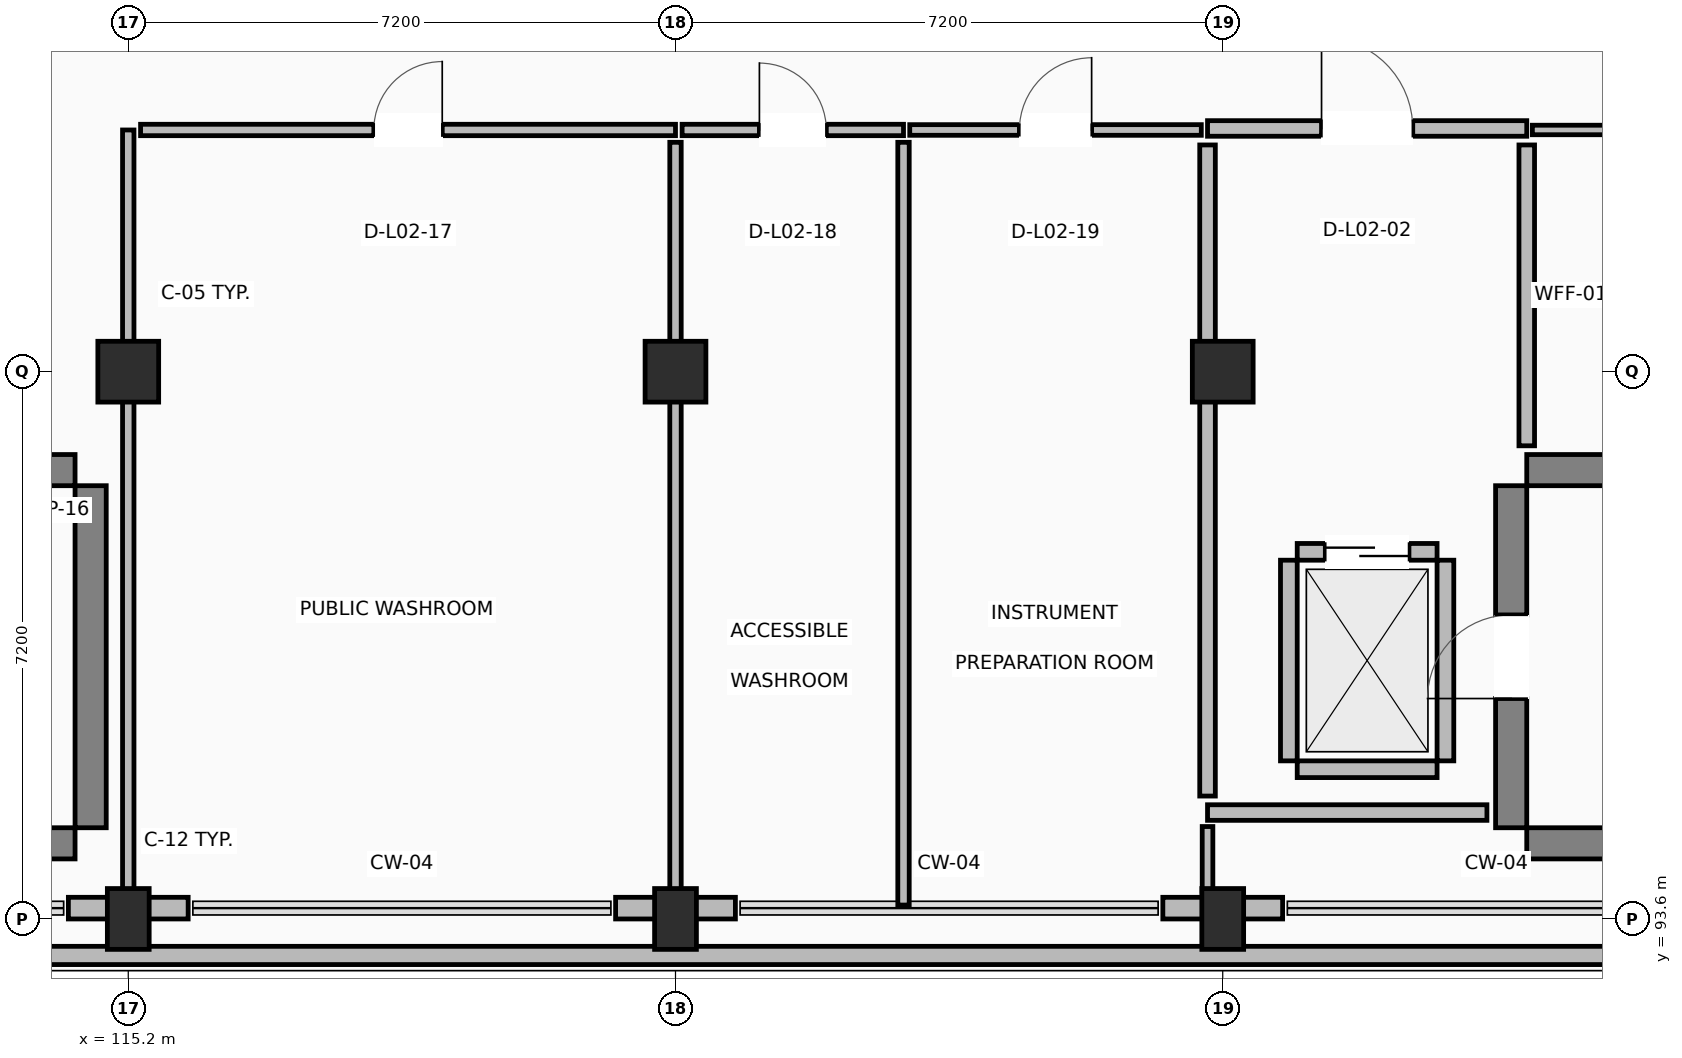
"""IFC4 building model, lengths in metres.
Left out: names, types, materials, properties, quantities, classifications, styles, units other than length and angle.
Written with IfcOpenShell. Run it as: python <this file> out.ifc"""

import sys

from ifc_helpers import new_model, si_unit, direction, frame, frame_2d, origin, origin_2d, place, context, subcontext, project, spatial, rectangle, extrude, element, fill, save


model = new_model("IFC4")
c1 = context("Model", 3, precision=1e-05, world=origin(), true_north=direction((0.0, 1.0)))
c2 = subcontext(c1, "Body", "Model", "MODEL_VIEW")
j1 = project(units=[si_unit("LENGTHUNIT", "METRE"), si_unit("PLANEANGLEUNIT", "RADIAN")], contexts=[c1])
p1 = place(None, origin())
s1 = spatial("IfcSite", under=j1, at=p1, CompositionType="ELEMENT")
p2 = place(p1, origin())
s2 = spatial("IfcBuilding", under=s1, at=p2, CompositionType="ELEMENT")
p3 = place(p2, frame((0.0, 0.0, 9.0)))
s3 = spatial("IfcBuildingStorey", under=s2, at=p3, CompositionType="ELEMENT", Elevation=9.0)
p4 = place(p3, frame((115.2, 93.6, 0.0), z_axis=(0.0, 0.0, 1.0), x_axis=(1.0, 0.0, 0.0)))
e1 = element("IfcColumn", 1, at=p4, inside=s3, PredefinedType="COLUMN", context=c2, shape_type="SweptSolid", body=[
    extrude(rectangle(XDim=0.55, YDim=0.8, at=origin_2d()), origin(), (0.0, 0.0, 1.0), 4.22),
])
p5 = place(p3, frame((115.2, 100.8, 0.0), z_axis=(0.0, 0.0, 1.0), x_axis=(1.0, 0.0, 0.0)))
e2 = element("IfcColumn", 2, at=p5, inside=s3, PredefinedType="COLUMN", context=c2, shape_type="SweptSolid", body=[
    extrude(rectangle(XDim=0.8, YDim=0.8, at=origin_2d()), origin(), (0.0, 0.0, 1.0), 4.22),
])
p6 = place(p3, frame((122.4, 93.6, 0.0), z_axis=(0.0, 0.0, 1.0), x_axis=(1.0, 0.0, 0.0)))
e3 = element("IfcColumn", 3, at=p6, inside=s3, PredefinedType="COLUMN", context=c2, shape_type="SweptSolid", body=[
    extrude(rectangle(XDim=0.55, YDim=0.8, at=origin_2d()), origin(), (0.0, 0.0, 1.0), 4.22),
])
p7 = place(p3, frame((122.4, 100.8, 0.0), z_axis=(0.0, 0.0, 1.0), x_axis=(1.0, 0.0, 0.0)))
e4 = element("IfcColumn", 4, at=p7, inside=s3, PredefinedType="COLUMN", context=c2, shape_type="SweptSolid", body=[
    extrude(rectangle(XDim=0.8, YDim=0.8, at=origin_2d()), origin(), (0.0, 0.0, 1.0), 4.22),
])
p8 = place(p3, frame((129.6, 93.6, 0.0), z_axis=(0.0, 0.0, 1.0), x_axis=(1.0, 0.0, 0.0)))
e5 = element("IfcColumn", 5, at=p8, inside=s3, PredefinedType="COLUMN", context=c2, shape_type="SweptSolid", body=[
    extrude(rectangle(XDim=0.55, YDim=0.8, at=origin_2d()), origin(), (0.0, 0.0, 1.0), 4.22),
])
p9 = place(p3, frame((129.6, 100.8, 0.0), z_axis=(0.0, 0.0, 1.0), x_axis=(1.0, 0.0, 0.0)))
e6 = element("IfcColumn", 6, at=p9, inside=s3, PredefinedType="COLUMN", context=c2, shape_type="SweptSolid", body=[
    extrude(rectangle(XDim=0.8, YDim=0.8, at=origin_2d()), origin(), (0.0, 0.0, 1.0), 4.22),
])
for number, where, z_axis, x_axis in (
    (7, (105.0, 94.595, 0.0), (0.0, 0.0, 1.0), (1.0, 0.0, 0.0)),
    (8, (105.0, 99.505, 0.0), (0.0, 0.0, 1.0), (1.0, 0.0, 0.0)),
):
    element("IfcWall", number, at=place(p3, frame(where, z_axis=z_axis, x_axis=x_axis)), inside=s3, PredefinedType="SHEAR", context=c2, shape_type="SweptSolid", body=[
        extrude(rectangle(XDim=9.5, YDim=0.41, at=frame_2d((4.75, 0.0))), origin(), (0.0, 0.0, 1.0), 4.22),
    ])
p10 = place(p3, frame((114.705, 94.8, 0.0), z_axis=(0.0, 0.0, 1.0), x_axis=(0.0, 1.0, 0.0)))
e9 = element("IfcWall", 9, at=p10, inside=s3, PredefinedType="SHEAR", context=c2, shape_type="SweptSolid", body=[
    extrude(rectangle(XDim=4.5, YDim=0.41, at=frame_2d((2.25, 0.0))), origin(), (0.0, 0.0, 1.0), 4.22),
])
for number, where, z_axis, x_axis in (
    (10, (133.6, 94.595, 0.0), (0.0, 0.0, 1.0), (1.0, 0.0, 0.0)),
    (11, (133.6, 99.505, 0.0), (0.0, 0.0, 1.0), (1.0, 0.0, 0.0)),
):
    element("IfcWall", number, at=place(p3, frame(where, z_axis=z_axis, x_axis=x_axis)), inside=s3, PredefinedType="SHEAR", context=c2, shape_type="SweptSolid", body=[
        extrude(rectangle(XDim=9.5, YDim=0.41, at=frame_2d((4.75, 0.0))), origin(), (0.0, 0.0, 1.0), 4.22),
    ])
p11 = place(p3, frame((133.395, 94.8, 0.0), z_axis=(0.0, 0.0, 1.0), x_axis=(0.0, 1.0, 0.0)))
e12 = element("IfcWall", 12, at=p11, inside=s3, PredefinedType="SHEAR", context=c2, shape_type="SweptSolid", body=[
    extrude(rectangle(XDim=4.5, YDim=0.41, at=frame_2d((2.25, 0.0))), origin(), (0.0, 0.0, 1.0), 4.22),
])
p12 = place(p11, frame((1.7, 0.0, 0.0)))
e13 = element("IfcOpeningElement", 13, at=p12, cuts=e12, PredefinedType="OPENING", context=c2, shape_type="SweptSolid", body=[
    extrude(rectangle(XDim=1.1, YDim=2.15, at=frame_2d((0.55, 1.075))), frame((0.0, 0.215, 0.0), z_axis=(0.0, -1.0, 0.0), x_axis=(1.0, 0.0, 0.0)), (0.0, 0.0, 1.0), 0.43),
])
for number, where, z_axis, x_axis in (
    (14, (114.412, 93.742, 0.0), (0.0, 0.0, 1.0), (1.0, 0.0, 0.0)),
    (15, (121.612, 93.742, 0.0), (0.0, 0.0, 1.0), (1.0, 0.0, 0.0)),
    (16, (128.812, 93.742, 0.0), (0.0, 0.0, 1.0), (1.0, 0.0, 0.0)),
):
    element("IfcWall", number, at=place(p3, frame(where, z_axis=z_axis, x_axis=x_axis)), inside=s3, PredefinedType="STANDARD", context=c2, shape_type="SweptSolid", body=[
        extrude(rectangle(XDim=1.576, YDim=0.285, at=frame_2d((0.788, 0.0))), origin(), (0.0, 0.0, 1.0), 3.26),
    ])
p13 = place(p3, frame((136.44, 93.12, 0.0), z_axis=(0.0, 0.0, 1.0), x_axis=(-1.0, 0.0, 0.0)))
e17 = element("IfcWall", 17, at=p13, inside=s3, PredefinedType="PARAPET", context=c2, shape_type="SweptSolid", body=[
    extrude(rectangle(XDim=57.84, YDim=0.24, at=frame_2d((28.92, 0.0))), origin(), (0.0, 0.0, 1.0), 1.12),
])
p14 = place(p3, frame((130.58, 95.57, 0.0), z_axis=(0.0, 0.0, 1.0), x_axis=(1.0, 0.0, 0.0)))
e18 = element("IfcWall", 18, at=p14, inside=s3, PredefinedType="STANDARD", context=c2, shape_type="SweptSolid", body=[
    extrude(rectangle(XDim=1.84, YDim=0.22, at=frame_2d((0.92, 0.0))), origin(), (0.0, 0.0, 1.0), 3.26),
])
p15 = place(p3, frame((130.58, 98.43, 0.0), z_axis=(0.0, 0.0, 1.0), x_axis=(1.0, 0.0, 0.0)))
e19 = element("IfcWall", 19, at=p15, inside=s3, PredefinedType="STANDARD", context=c2, shape_type="SweptSolid", body=[
    extrude(rectangle(XDim=1.84, YDim=0.22, at=frame_2d((0.92, 0.0))), origin(), (0.0, 0.0, 1.0), 3.26),
])
p16 = place(p15, frame((0.37, 0.0, 0.0)))
e20 = element("IfcOpeningElement", 20, at=p16, cuts=e19, PredefinedType="OPENING", context=c2, shape_type="SweptSolid", body=[
    extrude(rectangle(XDim=1.1, YDim=2.15, at=frame_2d((0.55, 1.075))), frame((0.0, 0.12, 0.0), z_axis=(0.0, -1.0, 0.0), x_axis=(1.0, 0.0, 0.0)), (0.0, 0.0, 1.0), 0.24),
])
for number, where, z_axis, x_axis in (
    (21, (130.47, 95.68, 0.0), (0.0, 0.0, 1.0), (0.0, 1.0, 0.0)),
    (22, (132.53, 95.68, 0.0), (0.0, 0.0, 1.0), (0.0, 1.0, 0.0)),
):
    element("IfcWall", number, at=place(p3, frame(where, z_axis=z_axis, x_axis=x_axis)), inside=s3, PredefinedType="STANDARD", context=c2, shape_type="SweptSolid", body=[
        extrude(rectangle(XDim=2.64, YDim=0.22, at=frame_2d((1.32, 0.0))), origin(), (0.0, 0.0, 1.0), 3.26),
    ])
p17 = place(p3, frame((129.4, 104.0, 0.0), z_axis=(0.0, 0.0, 1.0), x_axis=(1.0, 0.0, 0.0)))
e23 = element("IfcWall", 23, at=p17, inside=s3, PredefinedType="PARTITIONING", context=c2, shape_type="SweptSolid", body=[
    extrude(rectangle(XDim=4.2, YDim=0.205, at=frame_2d((2.1, 0.0))), origin(), (0.0, 0.0, 1.0), 3.26),
])
p18 = place(p17, frame((1.5, 0.0, 0.0)))
e24 = element("IfcOpeningElement", 24, at=p18, cuts=e23, PredefinedType="OPENING", context=c2, shape_type="SweptSolid", body=[
    extrude(rectangle(XDim=1.2, YDim=2.15, at=frame_2d((0.6, 1.075))), frame((0.0, 0.113, 0.0), z_axis=(0.0, -1.0, 0.0), x_axis=(1.0, 0.0, 0.0)), (0.0, 0.0, 1.0), 0.225),
])
p19 = place(p3, frame((133.6, 103.783, 0.0), z_axis=(0.0, 0.0, 1.0), x_axis=(0.0, -1.0, 0.0)))
e25 = element("IfcWall", 25, at=p19, inside=s3, PredefinedType="PARTITIONING", context=c2, shape_type="SweptSolid", body=[
    extrude(rectangle(XDim=3.958, YDim=0.205, at=frame_2d((1.979, 0.0))), origin(), (0.0, 0.0, 1.0), 3.26),
])
p20 = place(p3, frame((133.076, 95.0, 0.0), z_axis=(0.0, 0.0, 1.0), x_axis=(-1.0, 0.0, 0.0)))
e26 = element("IfcWall", 26, at=p20, inside=s3, PredefinedType="PARTITIONING", context=c2, shape_type="SweptSolid", body=[
    extrude(rectangle(XDim=3.676, YDim=0.205, at=frame_2d((1.838, 0.0))), origin(), (0.0, 0.0, 1.0), 3.26),
])
p21 = place(p3, frame((129.4, 95.217, 0.0), z_axis=(0.0, 0.0, 1.0), x_axis=(0.0, 1.0, 0.0)))
e27 = element("IfcWall", 27, at=p21, inside=s3, PredefinedType="PARTITIONING", context=c2, shape_type="SweptSolid", body=[
    extrude(rectangle(XDim=8.566, YDim=0.205, at=frame_2d((4.283, 0.0))), origin(), (0.0, 0.0, 1.0), 3.26),
])
p22 = place(p3, frame((115.2, 93.972, 0.0), z_axis=(0.0, 0.0, 1.0), x_axis=(0.0, 1.0, 0.0)))
e28 = element("IfcWall", 28, at=p22, inside=s3, PredefinedType="PARTITIONING", context=c2, shape_type="SweptSolid", body=[
    extrude(rectangle(XDim=10.008, YDim=0.15, at=frame_2d((5.004, 0.0))), origin(), (0.0, 0.0, 1.0), 3.26),
])
p23 = place(p3, frame((115.362, 103.98, 0.0), z_axis=(0.0, 0.0, 1.0), x_axis=(1.0, 0.0, 0.0)))
e29 = element("IfcWall", 29, at=p23, inside=s3, PredefinedType="PARTITIONING", context=c2, shape_type="SweptSolid", body=[
    extrude(rectangle(XDim=7.038, YDim=0.15, at=frame_2d((3.519, 0.0))), origin(), (0.0, 0.0, 1.0), 3.26),
])
p24 = place(p23, frame((3.069, 0.0, 0.0)))
e30 = element("IfcOpeningElement", 30, at=p24, cuts=e29, PredefinedType="OPENING", context=c2, shape_type="SweptSolid", body=[
    extrude(rectangle(XDim=0.9, YDim=2.1, at=frame_2d((0.45, 1.05))), frame((0.0, 0.085, 0.0), z_axis=(0.0, -1.0, 0.0), x_axis=(1.0, 0.0, 0.0)), (0.0, 0.0, 1.0), 0.17),
])
p25 = place(p3, frame((122.4, 103.818, 0.0), z_axis=(0.0, 0.0, 1.0), x_axis=(0.0, -1.0, 0.0)))
e31 = element("IfcWall", 31, at=p25, inside=s3, PredefinedType="PARTITIONING", context=c2, shape_type="SweptSolid", body=[
    extrude(rectangle(XDim=9.846, YDim=0.15, at=frame_2d((4.923, 0.0))), origin(), (0.0, 0.0, 1.0), 3.26),
])
p26 = place(p3, frame((122.487, 103.98, 0.0), z_axis=(0.0, 0.0, 1.0), x_axis=(1.0, 0.0, 0.0)))
e32 = element("IfcWall", 32, at=p26, inside=s3, PredefinedType="PARTITIONING", context=c2, shape_type="SweptSolid", body=[
    extrude(rectangle(XDim=2.913, YDim=0.15, at=frame_2d((1.457, 0.0))), origin(), (0.0, 0.0, 1.0), 3.26),
])
p27 = place(p26, frame((1.017, 0.0, 0.0)))
e33 = element("IfcOpeningElement", 33, at=p27, cuts=e32, PredefinedType="OPENING", context=c2, shape_type="SweptSolid", body=[
    extrude(rectangle(XDim=0.88, YDim=2.1, at=frame_2d((0.44, 1.05))), frame((0.0, 0.085, 0.0), z_axis=(0.0, -1.0, 0.0), x_axis=(1.0, 0.0, 0.0)), (0.0, 0.0, 1.0), 0.17),
])
p28 = place(p3, frame((125.4, 103.818, 0.0), z_axis=(0.0, 0.0, 1.0), x_axis=(0.0, -1.0, 0.0)))
e34 = element("IfcWall", 34, at=p28, inside=s3, PredefinedType="PARTITIONING", context=c2, shape_type="SweptSolid", body=[
    extrude(rectangle(XDim=10.035, YDim=0.15, at=frame_2d((5.018, 0.0))), origin(), (0.0, 0.0, 1.0), 3.26),
])
p29 = place(p3, frame((125.482, 103.98, 0.0), z_axis=(0.0, 0.0, 1.0), x_axis=(1.0, 0.0, 0.0)))
e35 = element("IfcWall", 35, at=p29, inside=s3, PredefinedType="PARTITIONING", context=c2, shape_type="SweptSolid", body=[
    extrude(rectangle(XDim=3.836, YDim=0.14, at=frame_2d((1.918, 0.0))), origin(), (0.0, 0.0, 1.0), 3.26),
])
p30 = place(p29, frame((1.443, 0.0, 0.0)))
e36 = element("IfcOpeningElement", 36, at=p30, cuts=e35, PredefinedType="OPENING", context=c2, shape_type="SweptSolid", body=[
    extrude(rectangle(XDim=0.95, YDim=2.1, at=frame_2d((0.475, 1.05))), frame((0.0, 0.08, 0.0), z_axis=(0.0, -1.0, 0.0), x_axis=(1.0, 0.0, 0.0)), (0.0, 0.0, 1.0), 0.16),
])
p31 = place(p3, frame((129.4, 94.816, 0.0), z_axis=(0.0, 0.0, 1.0), x_axis=(0.0, -1.0, 0.0)))
e37 = element("IfcWall", 37, at=p31, inside=s3, PredefinedType="PARTITIONING", context=c2, shape_type="SweptSolid", body=[
    extrude(rectangle(XDim=0.849, YDim=0.14, at=frame_2d((0.424, 0.0))), origin(), (0.0, 0.0, 1.0), 3.26),
])
p32 = place(p3, frame((133.674, 103.98, 0.0), z_axis=(0.0, 0.0, 1.0), x_axis=(1.0, 0.0, 0.0)))
e38 = element("IfcWall", 38, at=p32, inside=s3, PredefinedType="PARTITIONING", context=c2, shape_type="SweptSolid", body=[
    extrude(rectangle(XDim=11.306, YDim=0.125, at=frame_2d((5.653, 0.0))), origin(), (0.0, 0.0, 1.0), 3.26),
])
p33 = place(p32, frame((5.193, 0.0, 0.0)))
e39 = element("IfcOpeningElement", 39, at=p33, cuts=e38, PredefinedType="OPENING", context=c2, shape_type="SweptSolid", body=[
    extrude(rectangle(XDim=0.92, YDim=2.1, at=frame_2d((0.46, 1.05))), frame((0.0, 0.073, 0.0), z_axis=(0.0, -1.0, 0.0), x_axis=(1.0, 0.0, 0.0)), (0.0, 0.0, 1.0), 0.145),
])
p34 = place(p12, origin())
e40 = element("IfcDoor", 40, at=p34, inside=s3, OperationType="SINGLE_SWING_LEFT", PredefinedType="DOOR", context=c2, shape_type="SweptSolid", body=[
    extrude(rectangle(XDim=1.1, YDim=2.15, at=frame_2d((0.55, 1.075))), frame((0.0, 0.025, 0.0), z_axis=(0.0, -1.0, 0.0), x_axis=(1.0, 0.0, 0.0)), (0.0, 0.0, 1.0), 0.05),
])
fill(e13, e40)
p35 = place(p16, origin())
e41 = element("IfcDoor", 41, at=p35, inside=s3, OperationType="SLIDING_TO_LEFT", PredefinedType="DOOR", context=c2, shape_type="SweptSolid", body=[
    extrude(rectangle(XDim=1.1, YDim=2.15, at=frame_2d((0.55, 1.075))), frame((0.0, 0.025, 0.0), z_axis=(0.0, -1.0, 0.0), x_axis=(1.0, 0.0, 0.0)), (0.0, 0.0, 1.0), 0.05),
])
fill(e20, e41)
p36 = place(p18, origin())
e42 = element("IfcDoor", 42, at=p36, inside=s3, OperationType="SINGLE_SWING_LEFT", PredefinedType="DOOR", context=c2, shape_type="SweptSolid", body=[
    extrude(rectangle(XDim=1.2, YDim=2.15, at=frame_2d((0.6, 1.075))), frame((0.0, 0.025, 0.0), z_axis=(0.0, -1.0, 0.0), x_axis=(1.0, 0.0, 0.0)), (0.0, 0.0, 1.0), 0.05),
])
fill(e24, e42)
p37 = place(p24, origin())
e43 = element("IfcDoor", 43, at=p37, inside=s3, OperationType="SINGLE_SWING_RIGHT", PredefinedType="DOOR", context=c2, shape_type="SweptSolid", body=[
    extrude(rectangle(XDim=0.9, YDim=2.1, at=frame_2d((0.45, 1.05))), frame((0.0, 0.025, 0.0), z_axis=(0.0, -1.0, 0.0), x_axis=(1.0, 0.0, 0.0)), (0.0, 0.0, 1.0), 0.05),
])
fill(e30, e43)
p38 = place(p27, origin())
e44 = element("IfcDoor", 44, at=p38, inside=s3, OperationType="SINGLE_SWING_LEFT", PredefinedType="DOOR", context=c2, shape_type="SweptSolid", body=[
    extrude(rectangle(XDim=0.88, YDim=2.1, at=frame_2d((0.44, 1.05))), frame((0.0, 0.025, 0.0), z_axis=(0.0, -1.0, 0.0), x_axis=(1.0, 0.0, 0.0)), (0.0, 0.0, 1.0), 0.05),
])
fill(e33, e44)
p39 = place(p30, origin())
e45 = element("IfcDoor", 45, at=p39, inside=s3, OperationType="SINGLE_SWING_RIGHT", PredefinedType="DOOR", context=c2, shape_type="SweptSolid", body=[
    extrude(rectangle(XDim=0.95, YDim=2.1, at=frame_2d((0.475, 1.05))), frame((0.0, 0.025, 0.0), z_axis=(0.0, -1.0, 0.0), x_axis=(1.0, 0.0, 0.0)), (0.0, 0.0, 1.0), 0.05),
])
fill(e36, e45)
save(model, sys.argv[1])
